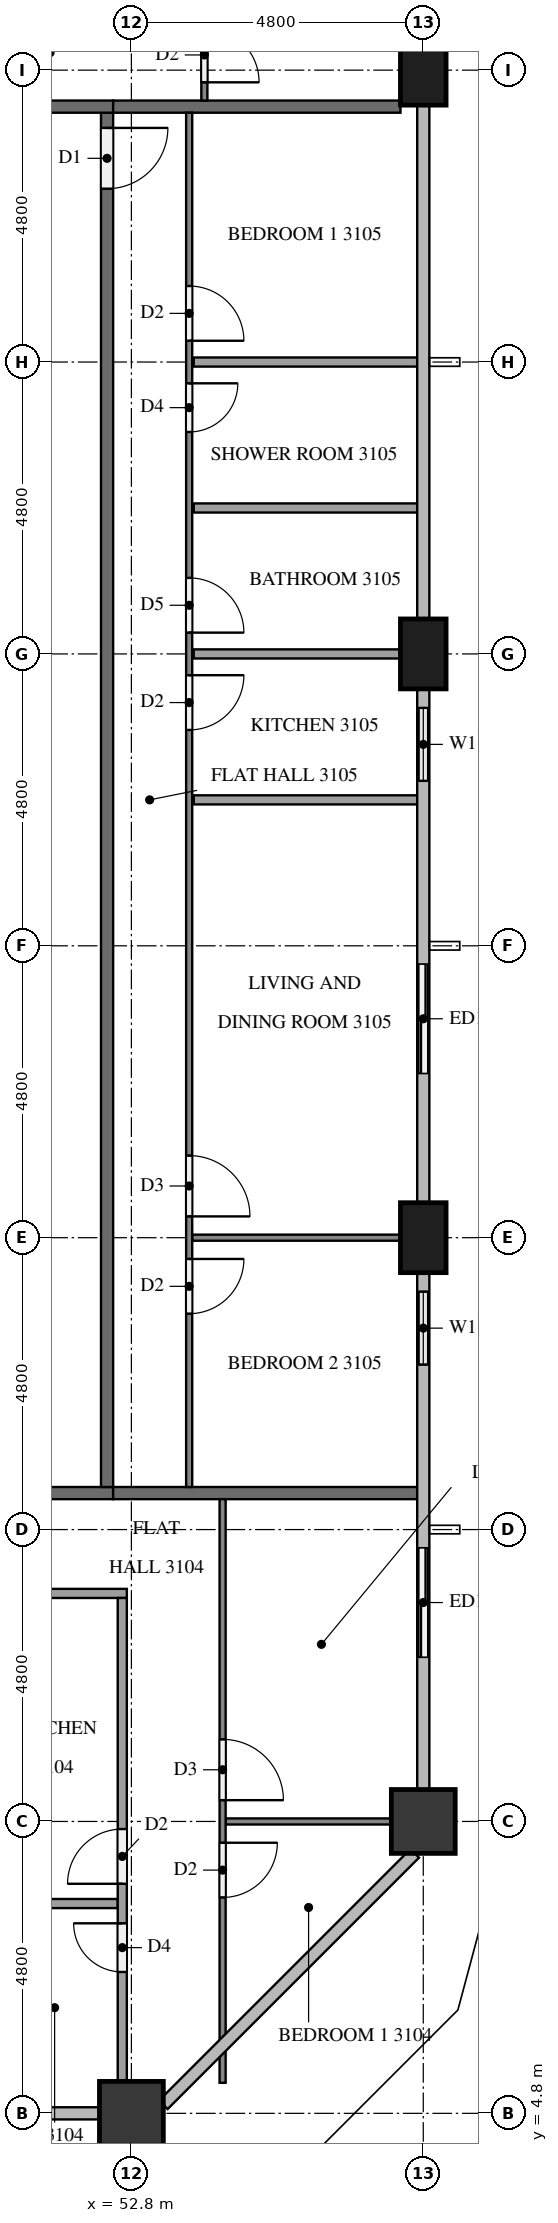
"""IFC4 building model, lengths in metres.
Left out: names, types, materials, properties, quantities, classifications, styles, units other than length and angle.
Written with IfcOpenShell. Run it as: python <this file> out.ifc"""

import sys

from ifc_helpers import new_model, si_unit, direction, frame, frame_2d, origin, origin_2d, place, context, subcontext, project, spatial, rectangle, extrude, element, fill, save


model = new_model("IFC4")
c1 = context("Model", 3, precision=1e-05, world=origin(), true_north=direction((0.0, 1.0)))
c2 = subcontext(c1, "Body", "Model", "MODEL_VIEW")
j1 = project(units=[si_unit("LENGTHUNIT", "METRE"), si_unit("PLANEANGLEUNIT", "RADIAN")], contexts=[c1])
p1 = place(None, origin())
s1 = spatial("IfcSite", under=j1, at=p1, CompositionType="ELEMENT")
p2 = place(p1, origin())
s2 = spatial("IfcBuilding", under=s1, at=p2, CompositionType="ELEMENT")
p3 = place(p2, frame((0.0, 0.0, 122.6)))
s3 = spatial("IfcBuildingStorey", under=s2, at=p3, CompositionType="ELEMENT", Elevation=122.6)
for number, where, z_axis, x_axis in (
    (1, (52.8, 4.8, 0.0), (0.0, 0.0, 1.0), (1.0, 0.0, 0.0)),
    (2, (57.6, 9.6, 0.0), (0.0, 0.0, 1.0), (1.0, 0.0, 0.0)),
):
    element("IfcColumn", number, at=place(p3, frame(where, z_axis=z_axis, x_axis=x_axis)), inside=s3, PredefinedType="COLUMN", context=c2, shape_type="SweptSolid", body=[
        extrude(rectangle(XDim=1.05, YDim=1.05, at=origin_2d()), origin(), (0.0, 0.0, 1.0), 3.2),
    ])
for number, where, z_axis, x_axis in (
    (3, (57.6, 19.2, 0.0), (0.0, 0.0, 1.0), (0.0, 1.0, 0.0)),
    (4, (57.6, 28.8, 0.0), (0.0, 0.0, 1.0), (0.0, 1.0, 0.0)),
    (5, (57.6, 38.4, 0.0), (0.0, 0.0, 1.0), (0.0, 1.0, 0.0)),
):
    element("IfcColumn", number, at=place(p3, frame(where, z_axis=z_axis, x_axis=x_axis)), inside=s3, PredefinedType="COLUMN", context=c2, shape_type="SweptSolid", body=[
        extrude(rectangle(XDim=1.15, YDim=0.75, at=origin_2d()), origin(), (0.0, 0.0, 1.0), 3.2),
    ])
p4 = place(p3, frame((57.6, 12.0, 0.0), z_axis=(0.0, 0.0, 1.0), x_axis=(0.0, 1.0, 0.0)))
e6 = element("IfcWall", 6, at=p4, inside=s3, PredefinedType="SOLIDWALL", context=c2, shape_type="SweptSolid", body=[
    extrude(rectangle(XDim=2.4, YDim=0.15, at=frame_2d((1.2, 0.0))), origin(), (0.0, 0.0, 1.0), 3.2),
])
p5 = place(p4, frame((0.3, 0.0, 0.0)))
e7 = element("IfcOpeningElement", 7, at=p5, cuts=e6, PredefinedType="OPENING", context=c2, shape_type="SweptSolid", body=[
    extrude(rectangle(XDim=1.8, YDim=2.4, at=frame_2d((0.9, 1.2))), frame((0.0, 0.085, 0.0), z_axis=(0.0, -1.0, 0.0), x_axis=(1.0, 0.0, 0.0)), (0.0, 0.0, 1.0), 0.17),
])
p6 = place(p3, frame((57.6, 16.8, 0.0), z_axis=(0.0, 0.0, 1.0), x_axis=(0.0, 1.0, 0.0)))
e8 = element("IfcWall", 8, at=p6, inside=s3, PredefinedType="SOLIDWALL", context=c2, shape_type="SweptSolid", body=[
    extrude(rectangle(XDim=1.825, YDim=0.15, at=frame_2d((0.913, 0.0))), origin(), (0.0, 0.0, 1.0), 3.2),
])
p7 = place(p6, frame((0.312, 0.0, 0.9)))
e9 = element("IfcOpeningElement", 9, at=p7, cuts=e8, PredefinedType="OPENING", context=c2, shape_type="SweptSolid", body=[
    extrude(rectangle(XDim=1.2, YDim=1.4, at=frame_2d((0.6, 0.7))), frame((0.0, 0.085, 0.0), z_axis=(0.0, -1.0, 0.0), x_axis=(1.0, 0.0, 0.0)), (0.0, 0.0, 1.0), 0.17),
])
p8 = place(p3, frame((57.6, 21.6, 0.0), z_axis=(0.0, 0.0, 1.0), x_axis=(0.0, 1.0, 0.0)))
e10 = element("IfcWall", 10, at=p8, inside=s3, PredefinedType="SOLIDWALL", context=c2, shape_type="SweptSolid", body=[
    extrude(rectangle(XDim=2.4, YDim=0.15, at=frame_2d((1.2, 0.0))), origin(), (0.0, 0.0, 1.0), 3.2),
])
p9 = place(p8, frame((0.3, 0.0, 0.0)))
e11 = element("IfcOpeningElement", 11, at=p9, cuts=e10, PredefinedType="OPENING", context=c2, shape_type="SweptSolid", body=[
    extrude(rectangle(XDim=1.8, YDim=2.4, at=frame_2d((0.9, 1.2))), frame((0.0, 0.085, 0.0), z_axis=(0.0, -1.0, 0.0), x_axis=(1.0, 0.0, 0.0)), (0.0, 0.0, 1.0), 0.17),
])
p10 = place(p3, frame((57.6, 26.4, 0.0), z_axis=(0.0, 0.0, 1.0), x_axis=(0.0, 1.0, 0.0)))
e12 = element("IfcWall", 12, at=p10, inside=s3, PredefinedType="SOLIDWALL", context=c2, shape_type="SweptSolid", body=[
    extrude(rectangle(XDim=1.825, YDim=0.15, at=frame_2d((0.913, 0.0))), origin(), (0.0, 0.0, 1.0), 3.2),
])
p11 = place(p10, frame((0.312, 0.0, 0.9)))
e13 = element("IfcOpeningElement", 13, at=p11, cuts=e12, PredefinedType="OPENING", context=c2, shape_type="SweptSolid", body=[
    extrude(rectangle(XDim=1.2, YDim=1.4, at=frame_2d((0.6, 0.7))), frame((0.0, 0.085, 0.0), z_axis=(0.0, -1.0, 0.0), x_axis=(1.0, 0.0, 0.0)), (0.0, 0.0, 1.0), 0.17),
])
p12 = place(p3, frame((50.3, 15.0, 0.0), z_axis=(0.0, 0.0, 1.0), x_axis=(1.0, 0.0, 0.0)))
e14 = element("IfcWall", 14, at=p12, inside=s3, PredefinedType="PARTITIONING", context=c2, shape_type="SweptSolid", body=[
    extrude(rectangle(XDim=2.2, YDim=0.2, at=frame_2d((1.1, 0.0))), origin(), (0.0, 0.0, 1.0), 3.2),
])
p13 = place(p3, frame((52.4, 37.7, 0.0), z_axis=(0.0, 0.0, 1.0), x_axis=(0.0, -1.0, 0.0)))
e15 = element("IfcWall", 15, at=p13, inside=s3, PredefinedType="PARTITIONING", context=c2, shape_type="SweptSolid", body=[
    extrude(rectangle(XDim=22.6, YDim=0.2, at=frame_2d((11.3, 0.0))), origin(), (0.0, 0.0, 1.0), 3.2),
])
p14 = place(p13, frame((0.25, 0.0, 0.0)))
e16 = element("IfcOpeningElement", 16, at=p14, cuts=e15, PredefinedType="OPENING", context=c2, shape_type="SweptSolid", body=[
    extrude(rectangle(XDim=1.0, YDim=2.1, at=frame_2d((0.5, 1.05))), frame((0.0, 0.11, 0.0), z_axis=(0.0, -1.0, 0.0), x_axis=(1.0, 0.0, 0.0)), (0.0, 0.0, 1.0), 0.22),
])
p15 = place(p3, frame((52.5, 37.8, 0.0), z_axis=(0.0, 0.0, 1.0), x_axis=(-1.0, 0.0, 0.0)))
e17 = element("IfcWall", 17, at=p15, inside=s3, PredefinedType="PARTITIONING", context=c2, shape_type="SweptSolid", body=[
    extrude(rectangle(XDim=2.2, YDim=0.2, at=frame_2d((1.1, 0.0))), origin(), (0.0, 0.0, 1.0), 3.2),
])
p16 = place(p3, frame((52.5, 15.0, 0.0), z_axis=(0.0, 0.0, 1.0), x_axis=(1.0, 0.0, 0.0)))
e18 = element("IfcWall", 18, at=p16, inside=s3, PredefinedType="PARTITIONING", context=c2, shape_type="SweptSolid", body=[
    extrude(rectangle(XDim=5.0, YDim=0.2, at=frame_2d((2.5, 0.0))), origin(), (0.0, 0.0, 1.0), 3.2),
])
p17 = place(p3, frame((52.5, 37.8, 0.0), z_axis=(0.0, 0.0, 1.0), x_axis=(1.0, 0.0, 0.0)))
e19 = element("IfcWall", 19, at=p17, inside=s3, PredefinedType="PARTITIONING", context=c2, shape_type="SweptSolid", body=[
    extrude(rectangle(XDim=4.725, YDim=0.2, at=frame_2d((2.363, 0.0))), origin(), (0.0, 0.0, 1.0), 3.2),
])
p18 = place(p3, frame((54.35, 9.6, 0.0), z_axis=(0.0, 0.0, 1.0), x_axis=(1.0, 0.0, 0.0)))
e20 = element("IfcWall", 20, at=p18, inside=s3, PredefinedType="PARTITIONING", context=c2, shape_type="SweptSolid", body=[
    extrude(rectangle(XDim=2.725, YDim=0.1, at=frame_2d((1.362, 0.0))), origin(), (0.0, 0.0, 1.0), 3.2),
])
p19 = place(p3, frame((54.3, 14.9, 0.0), z_axis=(0.0, 0.0, 1.0), x_axis=(0.0, -1.0, 0.0)))
e21 = element("IfcWall", 21, at=p19, inside=s3, PredefinedType="PARTITIONING", context=c2, shape_type="SweptSolid", body=[
    extrude(rectangle(XDim=9.598, YDim=0.1, at=frame_2d((4.799, 0.0))), origin(), (0.0, 0.0, 1.0), 3.2),
])
p20 = place(p19, frame((3.95, 0.0, 0.0)))
e22 = element("IfcOpeningElement", 22, at=p20, cuts=e21, PredefinedType="OPENING", context=c2, shape_type="SweptSolid", body=[
    extrude(rectangle(XDim=1.0, YDim=2.1, at=frame_2d((0.5, 1.05))), frame((0.0, 0.06, 0.0), z_axis=(0.0, -1.0, 0.0), x_axis=(1.0, 0.0, 0.0)), (0.0, 0.0, 1.0), 0.12),
])
p21 = place(p19, frame((5.65, 0.0, 0.0)))
e23 = element("IfcOpeningElement", 23, at=p21, cuts=e21, PredefinedType="OPENING", context=c2, shape_type="SweptSolid", body=[
    extrude(rectangle(XDim=0.9, YDim=2.1, at=frame_2d((0.45, 1.05))), frame((0.0, 0.06, 0.0), z_axis=(0.0, -1.0, 0.0), x_axis=(1.0, 0.0, 0.0)), (0.0, 0.0, 1.0), 0.12),
])
p22 = place(p3, frame((50.5, 8.25, 0.0), z_axis=(0.0, 0.0, 1.0), x_axis=(1.0, 0.0, 0.0)))
e24 = element("IfcWall", 24, at=p22, inside=s3, PredefinedType="PARTITIONING", context=c2, shape_type="SweptSolid", body=[
    extrude(rectangle(XDim=2.075, YDim=0.15, at=frame_2d((1.038, 0.0))), origin(), (0.0, 0.0, 1.0), 3.2),
])
p23 = place(p3, frame((50.5, 13.35, 0.0), z_axis=(0.0, 0.0, 1.0), x_axis=(1.0, 0.0, 0.0)))
e25 = element("IfcWall", 25, at=p23, inside=s3, PredefinedType="PARTITIONING", context=c2, shape_type="SweptSolid", body=[
    extrude(rectangle(XDim=2.225, YDim=0.15, at=frame_2d((1.113, 0.0))), origin(), (0.0, 0.0, 1.0), 3.2),
])
p24 = place(p3, frame((52.65, 5.325, 0.0), z_axis=(0.0, 0.0, 1.0), x_axis=(0.0, 1.0, 0.0)))
e26 = element("IfcWall", 26, at=p24, inside=s3, PredefinedType="PARTITIONING", context=c2, shape_type="SweptSolid", body=[
    extrude(rectangle(XDim=7.95, YDim=0.15, at=frame_2d((3.975, 0.0))), origin(), (0.0, 0.0, 1.0), 3.2),
])
p25 = place(p24, frame((3.25, 0.0, 0.0)))
e27 = element("IfcOpeningElement", 27, at=p25, cuts=e26, PredefinedType="OPENING", context=c2, shape_type="SweptSolid", body=[
    extrude(rectangle(XDim=0.9, YDim=2.1, at=frame_2d((0.45, 1.05))), frame((0.0, 0.085, 0.0), z_axis=(0.0, -1.0, 0.0), x_axis=(1.0, 0.0, 0.0)), (0.0, 0.0, 1.0), 0.17),
])
p26 = place(p24, frame((1.8, 0.0, 0.0)))
e28 = element("IfcOpeningElement", 28, at=p26, cuts=e26, PredefinedType="OPENING", context=c2, shape_type="SweptSolid", body=[
    extrude(rectangle(XDim=0.8, YDim=2.1, at=frame_2d((0.4, 1.05))), frame((0.0, 0.085, 0.0), z_axis=(0.0, -1.0, 0.0), x_axis=(1.0, 0.0, 0.0)), (0.0, 0.0, 1.0), 0.17),
])
for number, where, z_axis, x_axis in (
    (29, (53.825, 33.6, 0.0), (0.0, 0.0, 1.0), (1.0, 0.0, 0.0)),
    (30, (53.825, 31.2, 0.0), (0.0, 0.0, 1.0), (1.0, 0.0, 0.0)),
):
    element("IfcWall", number, at=place(p3, frame(where, z_axis=z_axis, x_axis=x_axis)), inside=s3, PredefinedType="PARTITIONING", context=c2, shape_type="SweptSolid", body=[
        extrude(rectangle(XDim=3.675, YDim=0.15, at=frame_2d((1.837, 0.0))), origin(), (0.0, 0.0, 1.0), 3.2),
    ])
p27 = place(p3, frame((53.825, 28.8, 0.0), z_axis=(0.0, 0.0, 1.0), x_axis=(1.0, 0.0, 0.0)))
e31 = element("IfcWall", 31, at=p27, inside=s3, PredefinedType="PARTITIONING", context=c2, shape_type="SweptSolid", body=[
    extrude(rectangle(XDim=3.4, YDim=0.15, at=frame_2d((1.7, 0.0))), origin(), (0.0, 0.0, 1.0), 3.2),
])
p28 = place(p3, frame((53.825, 26.4, 0.0), z_axis=(0.0, 0.0, 1.0), x_axis=(1.0, 0.0, 0.0)))
e32 = element("IfcWall", 32, at=p28, inside=s3, PredefinedType="PARTITIONING", context=c2, shape_type="SweptSolid", body=[
    extrude(rectangle(XDim=3.675, YDim=0.15, at=frame_2d((1.837, 0.0))), origin(), (0.0, 0.0, 1.0), 3.2),
])
p29 = place(p3, frame((53.8, 19.2, 0.0), z_axis=(0.0, 0.0, 1.0), x_axis=(1.0, 0.0, 0.0)))
e33 = element("IfcWall", 33, at=p29, inside=s3, PredefinedType="PARTITIONING", context=c2, shape_type="SweptSolid", body=[
    extrude(rectangle(XDim=3.425, YDim=0.1, at=frame_2d((1.712, 0.0))), origin(), (0.0, 0.0, 1.0), 3.2),
])
p30 = place(p3, frame((53.75, 37.7, 0.0), z_axis=(0.0, 0.0, 1.0), x_axis=(0.0, -1.0, 0.0)))
e34 = element("IfcWall", 34, at=p30, inside=s3, PredefinedType="PARTITIONING", context=c2, shape_type="SweptSolid", body=[
    extrude(rectangle(XDim=22.6, YDim=0.1, at=frame_2d((11.3, 0.0))), origin(), (0.0, 0.0, 1.0), 3.2),
])
p31 = place(p30, frame((2.85, 0.0, 0.0)))
e35 = element("IfcOpeningElement", 35, at=p31, cuts=e34, PredefinedType="OPENING", context=c2, shape_type="SweptSolid", body=[
    extrude(rectangle(XDim=0.9, YDim=2.1, at=frame_2d((0.45, 1.05))), frame((0.0, 0.06, 0.0), z_axis=(0.0, -1.0, 0.0), x_axis=(1.0, 0.0, 0.0)), (0.0, 0.0, 1.0), 0.12),
])
p32 = place(p30, frame((4.45, 0.0, 0.0)))
e36 = element("IfcOpeningElement", 36, at=p32, cuts=e34, PredefinedType="OPENING", context=c2, shape_type="SweptSolid", body=[
    extrude(rectangle(XDim=0.8, YDim=2.1, at=frame_2d((0.4, 1.05))), frame((0.0, 0.06, 0.0), z_axis=(0.0, -1.0, 0.0), x_axis=(1.0, 0.0, 0.0)), (0.0, 0.0, 1.0), 0.12),
])
p33 = place(p30, frame((7.65, 0.0, 0.0)))
e37 = element("IfcOpeningElement", 37, at=p33, cuts=e34, PredefinedType="OPENING", context=c2, shape_type="SweptSolid", body=[
    extrude(rectangle(XDim=0.9, YDim=2.1, at=frame_2d((0.45, 1.05))), frame((0.0, 0.06, 0.0), z_axis=(0.0, -1.0, 0.0), x_axis=(1.0, 0.0, 0.0)), (0.0, 0.0, 1.0), 0.12),
])
p34 = place(p30, frame((9.25, 0.0, 0.0)))
e38 = element("IfcOpeningElement", 38, at=p34, cuts=e34, PredefinedType="OPENING", context=c2, shape_type="SweptSolid", body=[
    extrude(rectangle(XDim=0.9, YDim=2.1, at=frame_2d((0.45, 1.05))), frame((0.0, 0.06, 0.0), z_axis=(0.0, -1.0, 0.0), x_axis=(1.0, 0.0, 0.0)), (0.0, 0.0, 1.0), 0.12),
])
p35 = place(p30, frame((17.15, 0.0, 0.0)))
e39 = element("IfcOpeningElement", 39, at=p35, cuts=e34, PredefinedType="OPENING", context=c2, shape_type="SweptSolid", body=[
    extrude(rectangle(XDim=1.0, YDim=2.1, at=frame_2d((0.5, 1.05))), frame((0.0, 0.06, 0.0), z_axis=(0.0, -1.0, 0.0), x_axis=(1.0, 0.0, 0.0)), (0.0, 0.0, 1.0), 0.12),
])
p36 = place(p30, frame((18.85, 0.0, 0.0)))
e40 = element("IfcOpeningElement", 40, at=p36, cuts=e34, PredefinedType="OPENING", context=c2, shape_type="SweptSolid", body=[
    extrude(rectangle(XDim=0.9, YDim=2.1, at=frame_2d((0.45, 1.05))), frame((0.0, 0.06, 0.0), z_axis=(0.0, -1.0, 0.0), x_axis=(1.0, 0.0, 0.0)), (0.0, 0.0, 1.0), 0.12),
])
p37 = place(p3, frame((54.0, 52.378, 0.0), z_axis=(0.0, 0.0, 1.0), x_axis=(0.0, -1.0, 0.0)))
e41 = element("IfcWall", 41, at=p37, inside=s3, PredefinedType="PARTITIONING", context=c2, shape_type="SweptSolid", body=[
    extrude(rectangle(XDim=14.479, YDim=0.1, at=frame_2d((7.239, 0.0))), origin(), (0.0, 0.0, 1.0), 3.2),
])
p38 = place(p37, frame((13.279, 0.0, 0.0)))
e42 = element("IfcOpeningElement", 42, at=p38, cuts=e41, PredefinedType="OPENING", context=c2, shape_type="SweptSolid", body=[
    extrude(rectangle(XDim=0.9, YDim=2.1, at=frame_2d((0.45, 1.05))), frame((0.0, 0.06, 0.0), z_axis=(0.0, -1.0, 0.0), x_axis=(1.0, 0.0, 0.0)), (0.0, 0.0, 1.0), 0.12),
])
p39 = place(p37, frame((4.729, 0.0, 0.0)))
e43 = element("IfcOpeningElement", 43, at=p39, cuts=e41, PredefinedType="OPENING", context=c2, shape_type="SweptSolid", body=[
    extrude(rectangle(XDim=1.0, YDim=2.1, at=frame_2d((0.5, 1.05))), frame((0.0, 0.06, 0.0), z_axis=(0.0, -1.0, 0.0), x_axis=(1.0, 0.0, 0.0)), (0.0, 0.0, 1.0), 0.12),
])
p40 = place(p37, frame((3.128, 0.0, 0.0)))
e44 = element("IfcOpeningElement", 44, at=p40, cuts=e41, PredefinedType="OPENING", context=c2, shape_type="SweptSolid", body=[
    extrude(rectangle(XDim=0.9, YDim=2.1, at=frame_2d((0.45, 1.05))), frame((0.0, 0.06, 0.0), z_axis=(0.0, -1.0, 0.0), x_axis=(1.0, 0.0, 0.0)), (0.0, 0.0, 1.0), 0.12),
])
p41 = place(p5, origin())
e45 = element("IfcDoor", 45, at=p41, inside=s3, OperationType="SLIDING_TO_LEFT", PredefinedType="DOOR", context=c2, shape_type="SweptSolid", body=[
    extrude(rectangle(XDim=1.8, YDim=2.4, at=frame_2d((0.9, 1.2))), frame((0.0, 0.025, 0.0), z_axis=(0.0, -1.0, 0.0), x_axis=(1.0, 0.0, 0.0)), (0.0, 0.0, 1.0), 0.05),
])
fill(e7, e45)
p42 = place(p7, origin())
e46 = element("IfcWindow", 46, at=p42, inside=s3, PartitioningType="SINGLE_PANEL", PredefinedType="WINDOW", context=c2, shape_type="SweptSolid", body=[
    extrude(rectangle(XDim=1.2, YDim=1.4, at=frame_2d((0.6, 0.7))), frame((0.0, 0.03, 0.0), z_axis=(0.0, -1.0, 0.0), x_axis=(1.0, 0.0, 0.0)), (0.0, 0.0, 1.0), 0.06),
])
fill(e9, e46)
p43 = place(p9, origin())
e47 = element("IfcDoor", 47, at=p43, inside=s3, OperationType="SLIDING_TO_RIGHT", PredefinedType="DOOR", context=c2, shape_type="SweptSolid", body=[
    extrude(rectangle(XDim=1.8, YDim=2.4, at=frame_2d((0.9, 1.2))), frame((0.0, 0.025, 0.0), z_axis=(0.0, -1.0, 0.0), x_axis=(1.0, 0.0, 0.0)), (0.0, 0.0, 1.0), 0.05),
])
fill(e11, e47)
p44 = place(p11, origin())
e48 = element("IfcWindow", 48, at=p44, inside=s3, PartitioningType="SINGLE_PANEL", PredefinedType="WINDOW", context=c2, shape_type="SweptSolid", body=[
    extrude(rectangle(XDim=1.2, YDim=1.4, at=frame_2d((0.6, 0.7))), frame((0.0, 0.03, 0.0), z_axis=(0.0, -1.0, 0.0), x_axis=(1.0, 0.0, 0.0)), (0.0, 0.0, 1.0), 0.06),
])
fill(e13, e48)
p45 = place(p14, origin())
e49 = element("IfcDoor", 49, at=p45, inside=s3, OperationType="SINGLE_SWING_LEFT", PredefinedType="DOOR", context=c2, shape_type="SweptSolid", body=[
    extrude(rectangle(XDim=1.0, YDim=2.1, at=frame_2d((0.5, 1.05))), frame((0.0, 0.025, 0.0), z_axis=(0.0, -1.0, 0.0), x_axis=(1.0, 0.0, 0.0)), (0.0, 0.0, 1.0), 0.05),
])
fill(e16, e49)
p46 = place(p20, origin())
e50 = element("IfcDoor", 50, at=p46, inside=s3, OperationType="SINGLE_SWING_RIGHT", PredefinedType="DOOR", context=c2, shape_type="SweptSolid", body=[
    extrude(rectangle(XDim=1.0, YDim=2.1, at=frame_2d((0.5, 1.05))), frame((0.0, 0.025, 0.0), z_axis=(0.0, -1.0, 0.0), x_axis=(1.0, 0.0, 0.0)), (0.0, 0.0, 1.0), 0.05),
])
fill(e22, e50)
p47 = place(p21, origin())
e51 = element("IfcDoor", 51, at=p47, inside=s3, OperationType="SINGLE_SWING_LEFT", PredefinedType="DOOR", context=c2, shape_type="SweptSolid", body=[
    extrude(rectangle(XDim=0.9, YDim=2.1, at=frame_2d((0.45, 1.05))), frame((0.0, 0.025, 0.0), z_axis=(0.0, -1.0, 0.0), x_axis=(1.0, 0.0, 0.0)), (0.0, 0.0, 1.0), 0.05),
])
fill(e23, e51)
p48 = place(p25, origin())
e52 = element("IfcDoor", 52, at=p48, inside=s3, OperationType="SINGLE_SWING_LEFT", PredefinedType="DOOR", context=c2, shape_type="SweptSolid", body=[
    extrude(rectangle(XDim=0.9, YDim=2.1, at=frame_2d((0.45, 1.05))), frame((0.0, 0.025, 0.0), z_axis=(0.0, -1.0, 0.0), x_axis=(1.0, 0.0, 0.0)), (0.0, 0.0, 1.0), 0.05),
])
fill(e27, e52)
p49 = place(p26, origin())
e53 = element("IfcDoor", 53, at=p49, inside=s3, OperationType="SINGLE_SWING_RIGHT", PredefinedType="DOOR", context=c2, shape_type="SweptSolid", body=[
    extrude(rectangle(XDim=0.8, YDim=2.1, at=frame_2d((0.4, 1.05))), frame((0.0, 0.025, 0.0), z_axis=(0.0, -1.0, 0.0), x_axis=(1.0, 0.0, 0.0)), (0.0, 0.0, 1.0), 0.05),
])
fill(e28, e53)
p50 = place(p31, origin())
e54 = element("IfcDoor", 54, at=p50, inside=s3, OperationType="SINGLE_SWING_RIGHT", PredefinedType="DOOR", context=c2, shape_type="SweptSolid", body=[
    extrude(rectangle(XDim=0.9, YDim=2.1, at=frame_2d((0.45, 1.05))), frame((0.0, 0.025, 0.0), z_axis=(0.0, -1.0, 0.0), x_axis=(1.0, 0.0, 0.0)), (0.0, 0.0, 1.0), 0.05),
])
fill(e35, e54)
p51 = place(p32, origin())
e55 = element("IfcDoor", 55, at=p51, inside=s3, OperationType="SINGLE_SWING_LEFT", PredefinedType="DOOR", context=c2, shape_type="SweptSolid", body=[
    extrude(rectangle(XDim=0.8, YDim=2.1, at=frame_2d((0.4, 1.05))), frame((0.0, 0.025, 0.0), z_axis=(0.0, -1.0, 0.0), x_axis=(1.0, 0.0, 0.0)), (0.0, 0.0, 1.0), 0.05),
])
fill(e36, e55)
p52 = place(p33, origin())
e56 = element("IfcDoor", 56, at=p52, inside=s3, OperationType="SINGLE_SWING_RIGHT", PredefinedType="DOOR", context=c2, shape_type="SweptSolid", body=[
    extrude(rectangle(XDim=0.9, YDim=2.1, at=frame_2d((0.45, 1.05))), frame((0.0, 0.025, 0.0), z_axis=(0.0, -1.0, 0.0), x_axis=(1.0, 0.0, 0.0)), (0.0, 0.0, 1.0), 0.05),
])
fill(e37, e56)
p53 = place(p34, origin())
e57 = element("IfcDoor", 57, at=p53, inside=s3, OperationType="SINGLE_SWING_LEFT", PredefinedType="DOOR", context=c2, shape_type="SweptSolid", body=[
    extrude(rectangle(XDim=0.9, YDim=2.1, at=frame_2d((0.45, 1.05))), frame((0.0, 0.025, 0.0), z_axis=(0.0, -1.0, 0.0), x_axis=(1.0, 0.0, 0.0)), (0.0, 0.0, 1.0), 0.05),
])
fill(e38, e57)
p54 = place(p35, origin())
e58 = element("IfcDoor", 58, at=p54, inside=s3, OperationType="SINGLE_SWING_RIGHT", PredefinedType="DOOR", context=c2, shape_type="SweptSolid", body=[
    extrude(rectangle(XDim=1.0, YDim=2.1, at=frame_2d((0.5, 1.05))), frame((0.0, 0.025, 0.0), z_axis=(0.0, -1.0, 0.0), x_axis=(1.0, 0.0, 0.0)), (0.0, 0.0, 1.0), 0.05),
])
fill(e39, e58)
p55 = place(p36, origin())
e59 = element("IfcDoor", 59, at=p55, inside=s3, OperationType="SINGLE_SWING_LEFT", PredefinedType="DOOR", context=c2, shape_type="SweptSolid", body=[
    extrude(rectangle(XDim=0.9, YDim=2.1, at=frame_2d((0.45, 1.05))), frame((0.0, 0.025, 0.0), z_axis=(0.0, -1.0, 0.0), x_axis=(1.0, 0.0, 0.0)), (0.0, 0.0, 1.0), 0.05),
])
fill(e40, e59)
p56 = place(p38, origin())
e60 = element("IfcDoor", 60, at=p56, inside=s3, OperationType="SINGLE_SWING_RIGHT", PredefinedType="DOOR", context=c2, shape_type="SweptSolid", body=[
    extrude(rectangle(XDim=0.9, YDim=2.1, at=frame_2d((0.45, 1.05))), frame((0.0, 0.025, 0.0), z_axis=(0.0, -1.0, 0.0), x_axis=(1.0, 0.0, 0.0)), (0.0, 0.0, 1.0), 0.05),
])
fill(e42, e60)
save(model, sys.argv[1])
